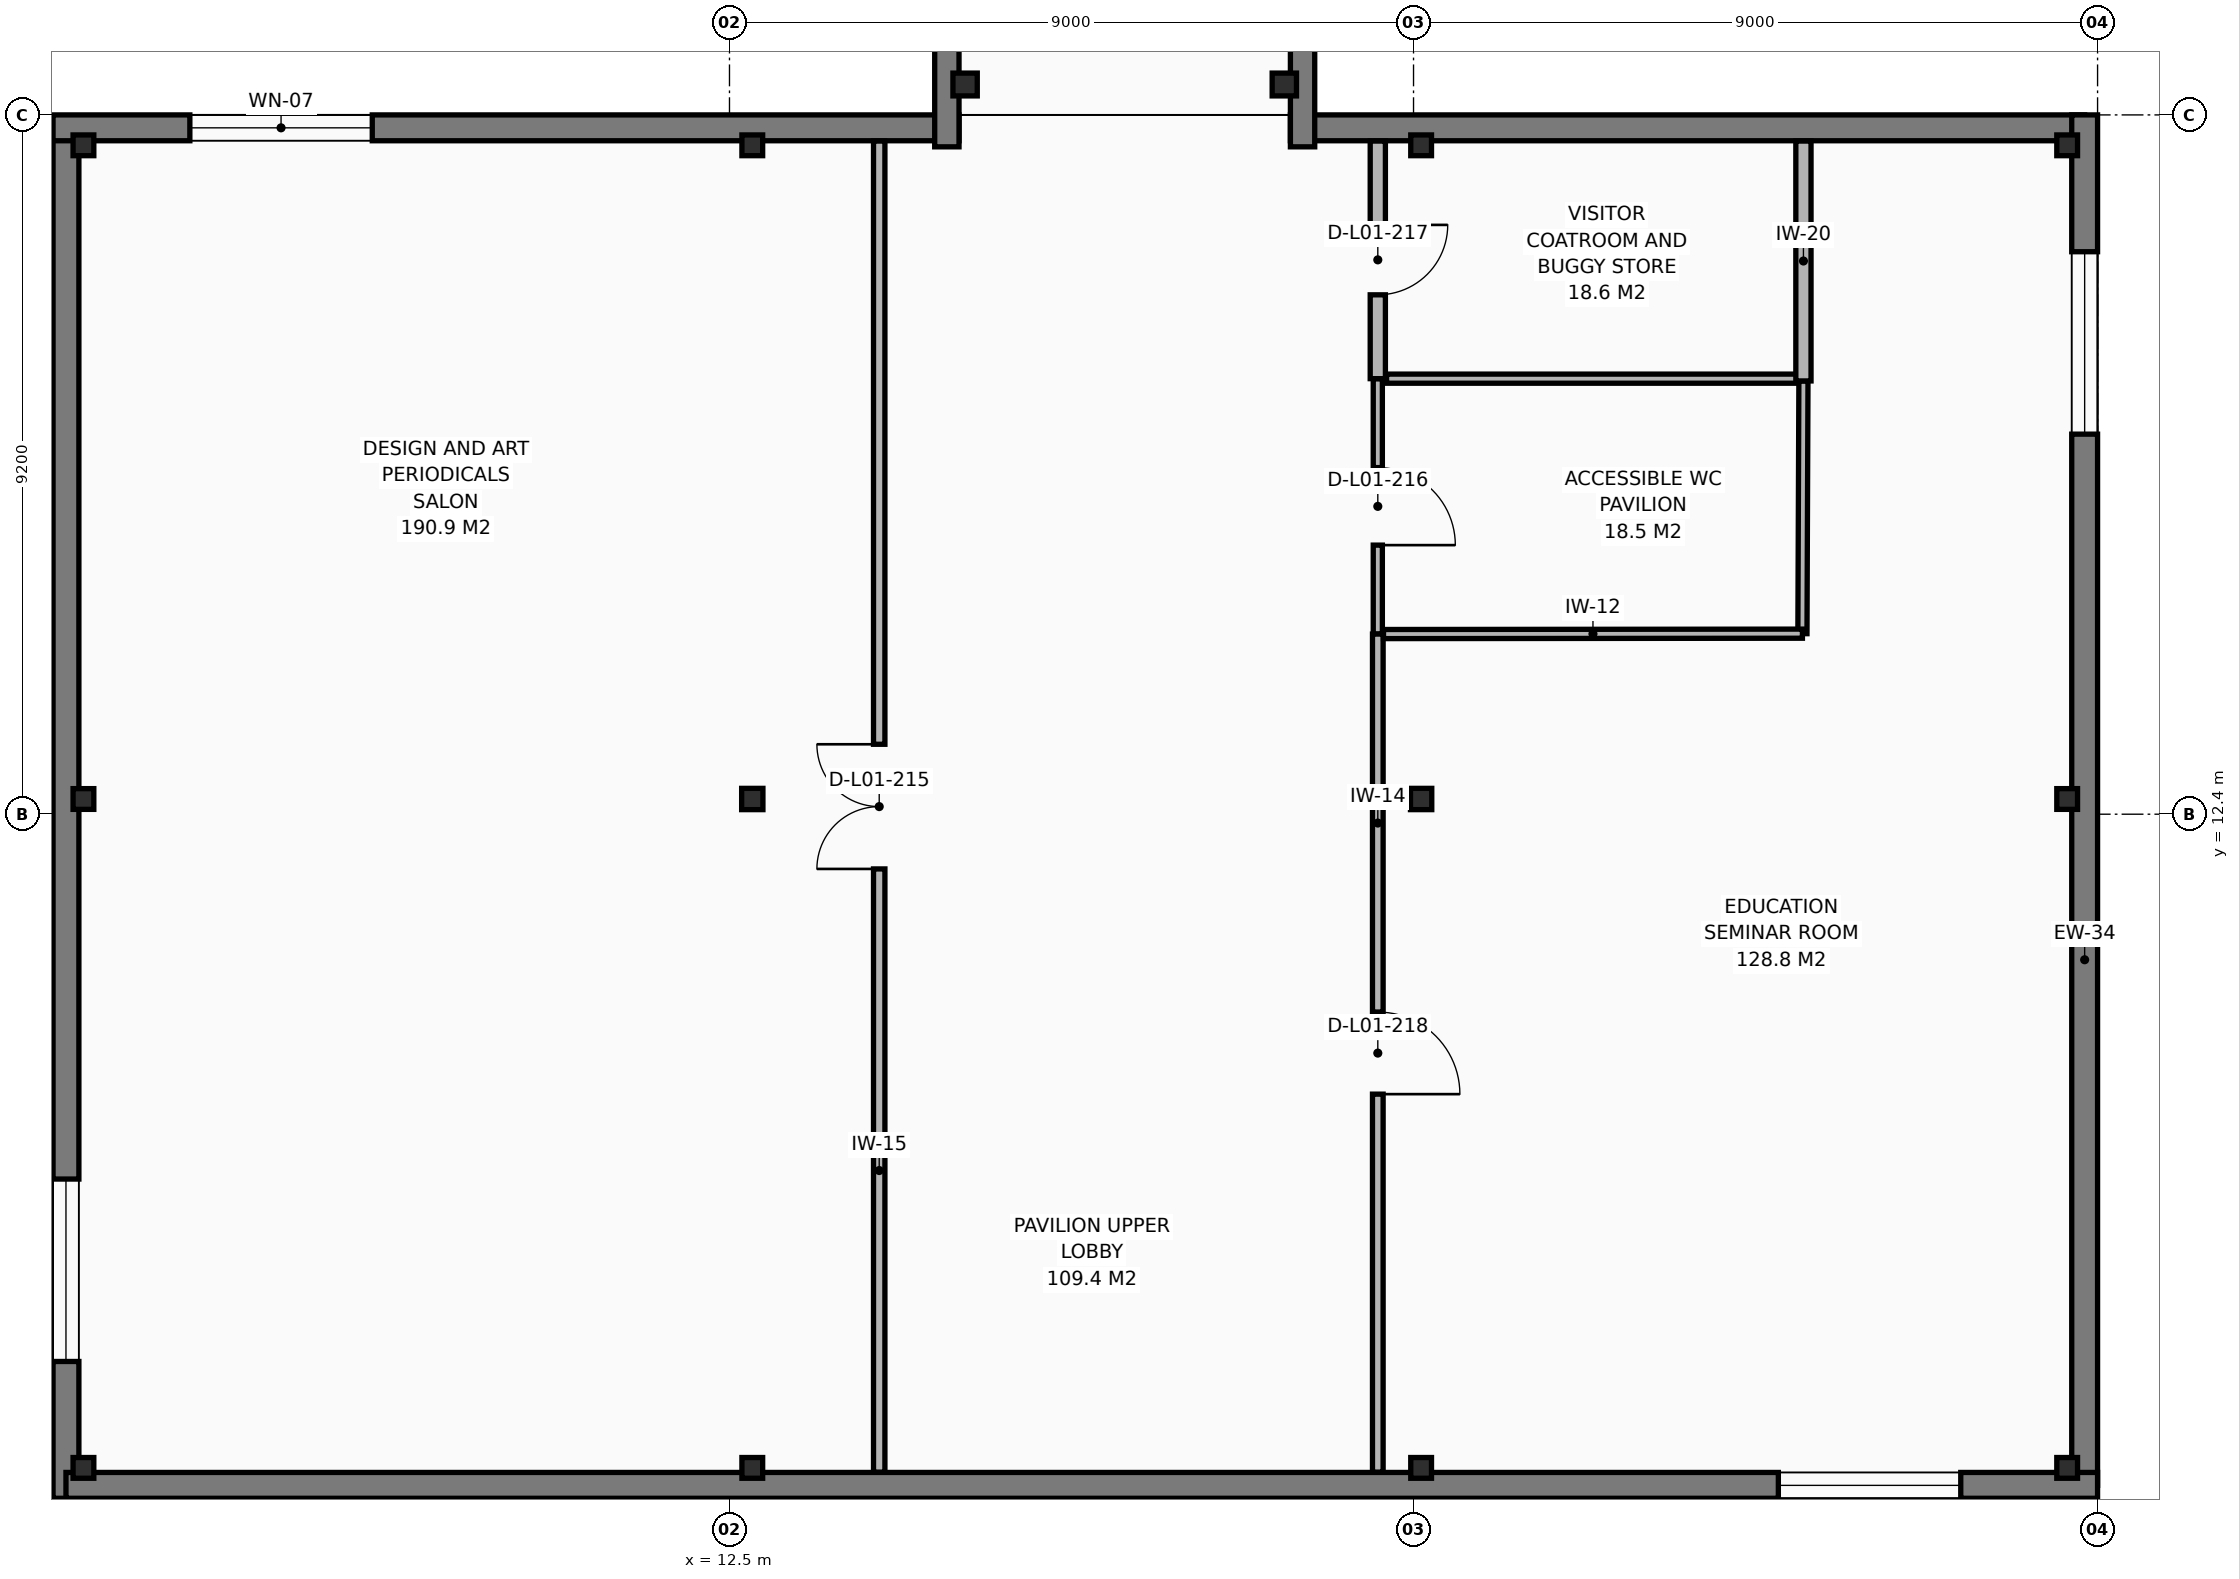
"""IFC4 building model, lengths in metres.
Left out: names, types, materials, properties, quantities, classifications, styles, units other than length and angle.
Written with IfcOpenShell. Run it as: python <this file> out.ifc"""

import sys

from ifc_helpers import new_model, si_unit, direction, frame, frame_2d, origin, origin_2d, place, context, subcontext, project, spatial, rectangle, hollow_circle, i_section, extrude, element, fill, save


model = new_model("IFC4")
c1 = context("Model", 3, precision=1e-05, world=origin(), true_north=direction((0.0, 1.0)))
c2 = subcontext(c1, "Body", "Model", "MODEL_VIEW")
j1 = project(units=[si_unit("LENGTHUNIT", "METRE"), si_unit("PLANEANGLEUNIT", "RADIAN")], contexts=[c1])
p1 = place(None, origin())
s1 = spatial("IfcSite", under=j1, at=p1, CompositionType="ELEMENT")
p2 = place(p1, origin())
s2 = spatial("IfcBuilding", under=s1, at=p2, CompositionType="ELEMENT")
p3 = place(p2, frame((0.0, 0.0, 5.1)))
s3 = spatial("IfcBuildingStorey", under=s2, at=p3, CompositionType="ELEMENT", Elevation=5.1)
for number, where, z_axis, x_axis in (
    (1, (4.0, 3.8, 0.0), (0.0, 0.0, 1.0), (1.0, 0.0, 0.0)),
    (2, (4.0, 12.6, 0.0), (0.0, 0.0, 1.0), (1.0, 0.0, 0.0)),
    (3, (4.0, 21.2, 0.0), (0.0, 0.0, 1.0), (1.0, 0.0, 0.0)),
    (4, (12.8, 3.8, 0.0), (0.0, 0.0, 1.0), (1.0, 0.0, 0.0)),
):
    element("IfcColumn", number, at=place(p3, frame(where, z_axis=z_axis, x_axis=x_axis)), inside=s3, PredefinedType="COLUMN", context=c2, shape_type="SweptSolid", body=[
        extrude(hollow_circle(Radius=0.136, WallThickness=0.012, at=origin_2d()), origin(), (0.0, 0.0, 1.0), 4.42),
    ])
p4 = place(p3, frame((12.8, 12.6, 0.0), z_axis=(0.0, 0.0, 1.0), x_axis=(1.0, 0.0, 0.0)))
e5 = element("IfcColumn", 5, at=p4, inside=s3, PredefinedType="COLUMN", context=c2, shape_type="SweptSolid", body=[
    extrude(i_section(OverallWidth=0.28, OverallDepth=0.28, WebThickness=0.01, FlangeThickness=0.018, FilletRadius=0.024, at=origin_2d()), origin(), (0.0, 0.0, 1.0), 4.42),
])
for number, where, z_axis, x_axis in (
    (6, (12.8, 21.2, 0.0), (0.0, 0.0, 1.0), (1.0, 0.0, 0.0)),
    (7, (21.6, 3.8, 0.0), (0.0, 0.0, 1.0), (1.0, 0.0, 0.0)),
):
    element("IfcColumn", number, at=place(p3, frame(where, z_axis=z_axis, x_axis=x_axis)), inside=s3, PredefinedType="COLUMN", context=c2, shape_type="SweptSolid", body=[
        extrude(hollow_circle(Radius=0.136, WallThickness=0.012, at=origin_2d()), origin(), (0.0, 0.0, 1.0), 4.42),
    ])
p5 = place(p3, frame((21.6, 12.6, 0.0), z_axis=(0.0, 0.0, 1.0), x_axis=(1.0, 0.0, 0.0)))
e8 = element("IfcColumn", 8, at=p5, inside=s3, PredefinedType="COLUMN", context=c2, shape_type="SweptSolid", body=[
    extrude(i_section(OverallWidth=0.28, OverallDepth=0.28, WebThickness=0.01, FlangeThickness=0.018, FilletRadius=0.024, at=origin_2d()), origin(), (0.0, 0.0, 1.0), 4.42),
])
for number, where, z_axis, x_axis in (
    (9, (21.6, 21.2, 0.0), (0.0, 0.0, 1.0), (1.0, 0.0, 0.0)),
    (10, (30.1, 3.8, 0.0), (0.0, 0.0, 1.0), (1.0, 0.0, 0.0)),
    (11, (30.1, 12.6, 0.0), (0.0, 0.0, 1.0), (1.0, 0.0, 0.0)),
    (12, (30.1, 21.2, 0.0), (0.0, 0.0, 1.0), (1.0, 0.0, 0.0)),
):
    element("IfcColumn", number, at=place(p3, frame(where, z_axis=z_axis, x_axis=x_axis)), inside=s3, PredefinedType="COLUMN", context=c2, shape_type="SweptSolid", body=[
        extrude(hollow_circle(Radius=0.136, WallThickness=0.012, at=origin_2d()), origin(), (0.0, 0.0, 1.0), 4.42),
    ])
for number, where, z_axis, x_axis in (
    (13, (15.6, 22.0, 0.0), (0.0, 0.0, 1.0), (1.0, 0.0, 0.0)),
    (14, (19.8, 22.0, 0.0), (0.0, 0.0, 1.0), (1.0, 0.0, 0.0)),
):
    element("IfcColumn", number, at=place(p3, frame(where, z_axis=z_axis, x_axis=x_axis)), inside=s3, PredefinedType="COLUMN", context=c2, shape_type="SweptSolid", body=[
        extrude(i_section(OverallWidth=0.3, OverallDepth=0.32, WebThickness=0.011, FlangeThickness=0.021, FilletRadius=0.027, at=origin_2d()), origin(), (0.0, 0.0, 1.0), 4.42),
    ])
p6 = place(p3, frame((3.77, 3.4, 0.0), z_axis=(0.0, 0.0, 1.0), x_axis=(0.0, 1.0, 0.0)))
e15 = element("IfcWall", 15, at=p6, inside=s3, PredefinedType="SOLIDWALL", context=c2, shape_type="SweptSolid", body=[
    extrude(rectangle(XDim=18.03, YDim=0.34, at=frame_2d((9.015, 0.0))), origin(), (0.0, 0.0, 1.0), 4.22),
])
p7 = place(p6, frame((1.8, 0.0, 0.85)))
e16 = element("IfcOpeningElement", 16, at=p7, cuts=e15, PredefinedType="OPENING", context=c2, shape_type="SweptSolid", body=[
    extrude(rectangle(XDim=2.4, YDim=1.5, at=frame_2d((1.2, 0.75))), frame((0.0, 0.18, 0.0), z_axis=(0.0, -1.0, 0.0), x_axis=(1.0, 0.0, 0.0)), (0.0, 0.0, 1.0), 0.36),
])
p8 = place(p3, frame((3.6, 21.43, 0.0), z_axis=(0.0, 0.0, 1.0), x_axis=(1.0, 0.0, 0.0)))
e17 = element("IfcWall", 17, at=p8, inside=s3, PredefinedType="SOLIDWALL", context=c2, shape_type="SweptSolid", body=[
    extrude(rectangle(XDim=11.92, YDim=0.34, at=frame_2d((5.96, 0.0))), origin(), (0.0, 0.0, 1.0), 4.22),
])
p9 = place(p8, frame((1.8, 0.0, 0.85)))
e18 = element("IfcOpeningElement", 18, at=p9, cuts=e17, PredefinedType="OPENING", context=c2, shape_type="SweptSolid", body=[
    extrude(rectangle(XDim=2.4, YDim=1.5, at=frame_2d((1.2, 0.75))), frame((0.0, 0.18, 0.0), z_axis=(0.0, -1.0, 0.0), x_axis=(1.0, 0.0, 0.0)), (0.0, 0.0, 1.0), 0.36),
])
p10 = place(p3, frame((19.88, 21.43, 0.0), z_axis=(0.0, 0.0, 1.0), x_axis=(1.0, 0.0, 0.0)))
e19 = element("IfcWall", 19, at=p10, inside=s3, PredefinedType="SOLIDWALL", context=c2, shape_type="SweptSolid", body=[
    extrude(rectangle(XDim=10.45, YDim=0.34, at=frame_2d((5.225, 0.0))), origin(), (0.0, 0.0, 1.0), 4.22),
])
p11 = place(p3, frame((30.33, 21.6, 0.0), z_axis=(0.0, 0.0, 1.0), x_axis=(0.0, -1.0, 0.0)))
e20 = element("IfcWall", 20, at=p11, inside=s3, PredefinedType="SOLIDWALL", context=c2, shape_type="SweptSolid", body=[
    extrude(rectangle(XDim=18.03, YDim=0.34, at=frame_2d((9.015, 0.0))), origin(), (0.0, 0.0, 1.0), 4.22),
])
p12 = place(p11, frame((1.8, 0.0, 0.85)))
e21 = element("IfcOpeningElement", 21, at=p12, cuts=e20, PredefinedType="OPENING", context=c2, shape_type="SweptSolid", body=[
    extrude(rectangle(XDim=2.4, YDim=1.5, at=frame_2d((1.2, 0.75))), frame((0.0, 0.18, 0.0), z_axis=(0.0, -1.0, 0.0), x_axis=(1.0, 0.0, 0.0)), (0.0, 0.0, 1.0), 0.36),
])
p13 = place(p3, frame((30.5, 3.57, 0.0), z_axis=(0.0, 0.0, 1.0), x_axis=(-1.0, 0.0, 0.0)))
e22 = element("IfcWall", 22, at=p13, inside=s3, PredefinedType="SOLIDWALL", context=c2, shape_type="SweptSolid", body=[
    extrude(rectangle(XDim=26.73, YDim=0.34, at=frame_2d((13.365, 0.0))), origin(), (0.0, 0.0, 1.0), 4.22),
])
p14 = place(p13, frame((1.8, 0.0, 0.85)))
e23 = element("IfcOpeningElement", 23, at=p14, cuts=e22, PredefinedType="OPENING", context=c2, shape_type="SweptSolid", body=[
    extrude(rectangle(XDim=2.4, YDim=1.5, at=frame_2d((1.2, 0.75))), frame((0.0, 0.18, 0.0), z_axis=(0.0, -1.0, 0.0), x_axis=(1.0, 0.0, 0.0)), (0.0, 0.0, 1.0), 0.36),
])
p15 = place(p3, frame((15.36, 21.18, 0.0), z_axis=(0.0, 0.0, 1.0), x_axis=(0.0, 1.0, 0.0)))
e24 = element("IfcWall", 24, at=p15, inside=s3, PredefinedType="SOLIDWALL", context=c2, shape_type="SweptSolid", body=[
    extrude(rectangle(XDim=18.565, YDim=0.32, at=frame_2d((9.283, 0.0))), origin(), (0.0, 0.0, 1.0), 4.17),
])
p16 = place(p15, frame((8.308, 0.0, 1.12)))
e25 = element("IfcOpeningElement", 25, at=p16, cuts=e24, PredefinedType="OPENING", context=c2, shape_type="SweptSolid", body=[
    extrude(rectangle(XDim=1.95, YDim=1.5, at=frame_2d((0.975, 0.75))), frame((0.0, 0.17, 0.0), z_axis=(0.0, -1.0, 0.0), x_axis=(1.0, 0.0, 0.0)), (0.0, 0.0, 1.0), 0.34),
])
p17 = place(p3, frame((20.04, 39.745, 0.0), z_axis=(0.0, 0.0, 1.0), x_axis=(0.0, -1.0, 0.0)))
e26 = element("IfcWall", 26, at=p17, inside=s3, PredefinedType="SOLIDWALL", context=c2, shape_type="SweptSolid", body=[
    extrude(rectangle(XDim=18.565, YDim=0.32, at=frame_2d((9.283, 0.0))), origin(), (0.0, 0.0, 1.0), 4.17),
])
p18 = place(p17, frame((8.308, 0.0, 1.12)))
e27 = element("IfcOpeningElement", 27, at=p18, cuts=e26, PredefinedType="OPENING", context=c2, shape_type="SweptSolid", body=[
    extrude(rectangle(XDim=1.95, YDim=1.5, at=frame_2d((0.975, 0.75))), frame((0.0, 0.17, 0.0), z_axis=(0.0, -1.0, 0.0), x_axis=(1.0, 0.0, 0.0)), (0.0, 0.0, 1.0), 0.34),
])
p19 = place(p3, frame((14.47, 3.744, 0.0), z_axis=(0.0, 0.0, 1.0), x_axis=(0.0, 1.0, 0.0)))
e28 = element("IfcWall", 28, at=p19, inside=s3, PredefinedType="PARTITIONING", context=c2, shape_type="SweptSolid", body=[
    extrude(rectangle(XDim=17.512, YDim=0.15, at=frame_2d((8.756, 0.0))), origin(), (0.0, 0.0, 1.0), 3.85),
])
p20 = place(p19, frame((7.936, 0.0, 0.0)))
e29 = element("IfcOpeningElement", 29, at=p20, cuts=e28, PredefinedType="OPENING", context=c2, shape_type="SweptSolid", body=[
    extrude(rectangle(XDim=1.64, YDim=2.2, at=frame_2d((0.82, 1.1))), frame((0.0, 0.085, 0.0), z_axis=(0.0, -1.0, 0.0), x_axis=(1.0, 0.0, 0.0)), (0.0, 0.0, 1.0), 0.17),
])
p21 = place(p3, frame((21.03, 18.13, 0.0), z_axis=(0.0, 0.0, 1.0), x_axis=(0.0, -1.0, 0.0)))
e30 = element("IfcWall", 30, at=p21, inside=s3, PredefinedType="PARTITIONING", context=c2, shape_type="SweptSolid", body=[
    extrude(rectangle(XDim=3.36, YDim=0.12, at=frame_2d((1.68, 0.0))), origin(), (0.0, 0.0, 1.0), 4.21),
])
p22 = place(p21, frame((1.17, 0.0, 0.0)))
e31 = element("IfcOpeningElement", 31, at=p22, cuts=e30, PredefinedType="OPENING", context=c2, shape_type="SweptSolid", body=[
    extrude(rectangle(XDim=1.02, YDim=2.12, at=frame_2d((0.51, 1.06))), frame((0.0, 0.07, 0.0), z_axis=(0.0, -1.0, 0.0), x_axis=(1.0, 0.0, 0.0)), (0.0, 0.0, 1.0), 0.14),
])
p23 = place(p3, frame((21.03, 21.256, 0.0), z_axis=(0.0, 0.0, 1.0), x_axis=(0.0, -1.0, 0.0)))
e32 = element("IfcWall", 32, at=p23, inside=s3, PredefinedType="PARTITIONING", context=c2, shape_type="SweptSolid", body=[
    extrude(rectangle(XDim=3.126, YDim=0.2, at=frame_2d((1.563, 0.0))), origin(), (0.0, 0.0, 1.0), 3.85),
])
p24 = place(p23, frame((1.103, 0.0, 0.0)))
e33 = element("IfcOpeningElement", 33, at=p24, cuts=e32, PredefinedType="OPENING", context=c2, shape_type="SweptSolid", body=[
    extrude(rectangle(XDim=0.92, YDim=2.08, at=frame_2d((0.46, 1.04))), frame((0.0, 0.11, 0.0), z_axis=(0.0, -1.0, 0.0), x_axis=(1.0, 0.0, 0.0)), (0.0, 0.0, 1.0), 0.22),
])
p25 = place(p3, frame((21.03, 14.77, 0.0), z_axis=(0.0, 0.0, 1.0), x_axis=(0.0, -1.0, 0.0)))
e34 = element("IfcWall", 34, at=p25, inside=s3, PredefinedType="PARTITIONING", context=c2, shape_type="SweptSolid", body=[
    extrude(rectangle(XDim=11.026, YDim=0.14, at=frame_2d((5.513, 0.0))), origin(), (0.0, 0.0, 1.0), 3.85),
])
p26 = place(p25, frame((4.973, 0.0, 0.0)))
e35 = element("IfcOpeningElement", 35, at=p26, cuts=e34, PredefinedType="OPENING", context=c2, shape_type="SweptSolid", body=[
    extrude(rectangle(XDim=1.08, YDim=2.12, at=frame_2d((0.54, 1.06))), frame((0.0, 0.08, 0.0), z_axis=(0.0, -1.0, 0.0), x_axis=(1.0, 0.0, 0.0)), (0.0, 0.0, 1.0), 0.16),
])
p27 = place(p3, frame((21.145, 18.13, 0.0), z_axis=(0.0, 0.0, 1.0), x_axis=(1.0, 0.0, 0.0)))
e36 = element("IfcWall", 36, at=p27, inside=s3, PredefinedType="PARTITIONING", context=c2, shape_type="SweptSolid", body=[
    extrude(rectangle(XDim=5.455, YDim=0.12, at=frame_2d((2.728, 0.0))), origin(), (0.0, 0.0, 1.0), 3.91),
])
p28 = place(p3, frame((26.63, 18.1, 0.0), z_axis=(0.0, 0.0, 1.0), x_axis=(-0.003965017661, -0.999992139287, 0.0)))
e37 = element("IfcWall", 37, at=p28, inside=s3, PredefinedType="PARTITIONING", context=c2, shape_type="SweptSolid", body=[
    extrude(rectangle(XDim=3.325, YDim=0.12, at=frame_2d((1.663, 0.0))), origin(), (0.0, 0.0, 1.0), 4.21),
])
p29 = place(p3, frame((26.617, 14.775, 0.0), z_axis=(0.0, 0.0, 1.0), x_axis=(-0.999999567372, -0.000930190951, 0.0)))
e38 = element("IfcWall", 38, at=p29, inside=s3, PredefinedType="PARTITIONING", context=c2, shape_type="SweptSolid", body=[
    extrude(rectangle(XDim=5.512, YDim=0.12, at=frame_2d((2.756, 0.0))), origin(), (0.0, 0.0, 1.0), 3.91),
])
p30 = place(p3, frame((26.63, 21.256, 0.0), z_axis=(0.0, 0.0, 1.0), x_axis=(0.0, -1.0, 0.0)))
e39 = element("IfcWall", 39, at=p30, inside=s3, PredefinedType="PARTITIONING", context=c2, shape_type="SweptSolid", body=[
    extrude(rectangle(XDim=3.156, YDim=0.2, at=frame_2d((1.578, 0.0))), origin(), (0.0, 0.0, 1.0), 3.85),
])
p31 = place(p7, origin())
e40 = element("IfcWindow", 40, at=p31, inside=s3, PartitioningType="SINGLE_PANEL", PredefinedType="WINDOW", context=c2, shape_type="SweptSolid", body=[
    extrude(rectangle(XDim=2.4, YDim=1.5, at=frame_2d((1.2, 0.75))), frame((0.0, 0.03, 0.0), z_axis=(0.0, -1.0, 0.0), x_axis=(1.0, 0.0, 0.0)), (0.0, 0.0, 1.0), 0.06),
])
fill(e16, e40)
p32 = place(p9, origin())
e41 = element("IfcWindow", 41, at=p32, inside=s3, PartitioningType="SINGLE_PANEL", PredefinedType="WINDOW", context=c2, shape_type="SweptSolid", body=[
    extrude(rectangle(XDim=2.4, YDim=1.5, at=frame_2d((1.2, 0.75))), frame((0.0, 0.03, 0.0), z_axis=(0.0, -1.0, 0.0), x_axis=(1.0, 0.0, 0.0)), (0.0, 0.0, 1.0), 0.06),
])
fill(e18, e41)
p33 = place(p12, origin())
e42 = element("IfcWindow", 42, at=p33, inside=s3, PartitioningType="SINGLE_PANEL", PredefinedType="WINDOW", context=c2, shape_type="SweptSolid", body=[
    extrude(rectangle(XDim=2.4, YDim=1.5, at=frame_2d((1.2, 0.75))), frame((0.0, 0.03, 0.0), z_axis=(0.0, -1.0, 0.0), x_axis=(1.0, 0.0, 0.0)), (0.0, 0.0, 1.0), 0.06),
])
fill(e21, e42)
p34 = place(p14, origin())
e43 = element("IfcWindow", 43, at=p34, inside=s3, PartitioningType="SINGLE_PANEL", PredefinedType="WINDOW", context=c2, shape_type="SweptSolid", body=[
    extrude(rectangle(XDim=2.4, YDim=1.5, at=frame_2d((1.2, 0.75))), frame((0.0, 0.03, 0.0), z_axis=(0.0, -1.0, 0.0), x_axis=(1.0, 0.0, 0.0)), (0.0, 0.0, 1.0), 0.06),
])
fill(e23, e43)
p35 = place(p20, origin())
e44 = element("IfcDoor", 44, at=p35, inside=s3, OperationType="DOUBLE_DOOR_SINGLE_SWING", PredefinedType="DOOR", context=c2, shape_type="SweptSolid", body=[
    extrude(rectangle(XDim=1.64, YDim=2.2, at=frame_2d((0.82, 1.1))), frame((0.0, 0.025, 0.0), z_axis=(0.0, -1.0, 0.0), x_axis=(1.0, 0.0, 0.0)), (0.0, 0.0, 1.0), 0.05),
])
fill(e29, e44)
p36 = place(p22, origin())
e45 = element("IfcDoor", 45, at=p36, inside=s3, OperationType="SINGLE_SWING_RIGHT", PredefinedType="DOOR", context=c2, shape_type="SweptSolid", body=[
    extrude(rectangle(XDim=1.02, YDim=2.12, at=frame_2d((0.51, 1.06))), frame((0.0, 0.025, 0.0), z_axis=(0.0, -1.0, 0.0), x_axis=(1.0, 0.0, 0.0)), (0.0, 0.0, 1.0), 0.05),
])
fill(e31, e45)
p37 = place(p24, origin())
e46 = element("IfcDoor", 46, at=p37, inside=s3, OperationType="SINGLE_SWING_LEFT", PredefinedType="DOOR", context=c2, shape_type="SweptSolid", body=[
    extrude(rectangle(XDim=0.92, YDim=2.08, at=frame_2d((0.46, 1.04))), frame((0.0, 0.025, 0.0), z_axis=(0.0, -1.0, 0.0), x_axis=(1.0, 0.0, 0.0)), (0.0, 0.0, 1.0), 0.05),
])
fill(e33, e46)
p38 = place(p26, origin())
e47 = element("IfcDoor", 47, at=p38, inside=s3, OperationType="SINGLE_SWING_RIGHT", PredefinedType="DOOR", context=c2, shape_type="SweptSolid", body=[
    extrude(rectangle(XDim=1.08, YDim=2.12, at=frame_2d((0.54, 1.06))), frame((0.0, 0.025, 0.0), z_axis=(0.0, -1.0, 0.0), x_axis=(1.0, 0.0, 0.0)), (0.0, 0.0, 1.0), 0.05),
])
fill(e35, e47)
save(model, sys.argv[1])
